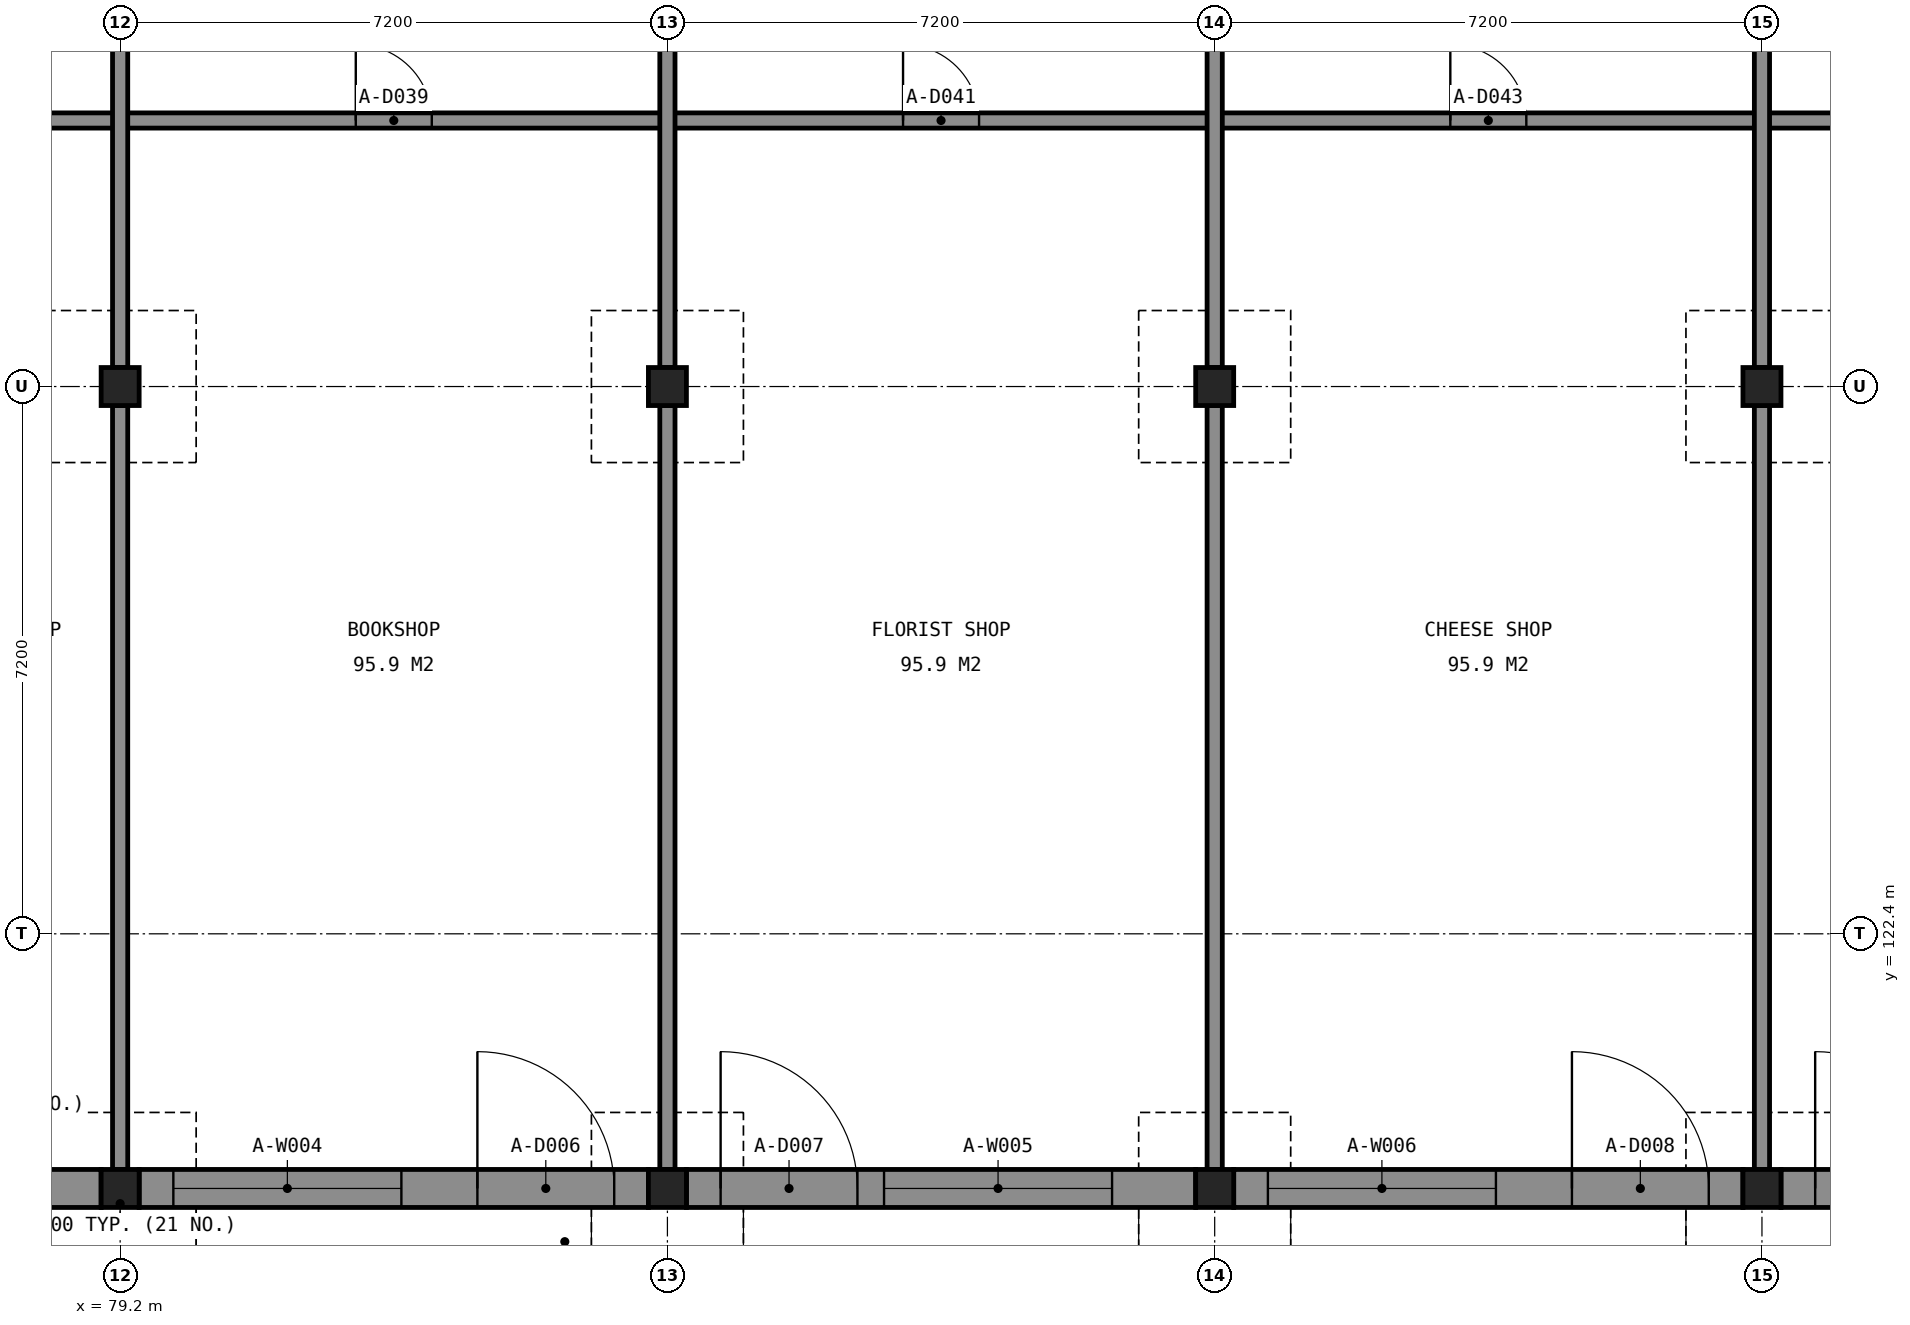
"""IFC4 building model, lengths in metres.
Left out: names, types, materials, properties, quantities, classifications, styles, units other than length and angle.
Written with IfcOpenShell. Run it as: python <this file> out.ifc"""

import sys

from ifc_helpers import new_model, si_unit, direction, frame, frame_2d, origin, origin_2d, place, context, subcontext, project, spatial, rectangle, extrude, element, fill, save


model = new_model("IFC4")
c1 = context("Model", 3, precision=1e-05, world=origin(), true_north=direction((0.0, 1.0)))
c2 = subcontext(c1, "Body", "Model", "MODEL_VIEW")
j1 = project(units=[si_unit("LENGTHUNIT", "METRE"), si_unit("PLANEANGLEUNIT", "RADIAN")], contexts=[c1])
p1 = place(None, origin())
s1 = spatial("IfcSite", under=j1, at=p1, CompositionType="ELEMENT")
p2 = place(p1, origin())
s2 = spatial("IfcBuilding", under=s1, at=p2, CompositionType="ELEMENT")
p3 = place(p2, origin())
s3 = spatial("IfcBuildingStorey", under=s2, at=p3, CompositionType="ELEMENT", Elevation=0.0)
for number, where, z_axis, x_axis in (
    (1, (79.2, 119.05, 0.0), (0.0, 0.0, 1.0), (1.0, 0.0, 0.0)),
    (2, (86.4, 119.05, 0.0), (0.0, 0.0, 1.0), (1.0, 0.0, 0.0)),
    (3, (93.6, 119.05, 0.0), (0.0, 0.0, 1.0), (1.0, 0.0, 0.0)),
    (4, (100.8, 119.05, 0.0), (0.0, 0.0, 1.0), (1.0, 0.0, 0.0)),
    (5, (79.2, 129.6, 0.0), (0.0, 0.0, 1.0), (1.0, 0.0, 0.0)),
    (6, (86.4, 129.6, 0.0), (0.0, 0.0, 1.0), (1.0, 0.0, 0.0)),
    (7, (93.6, 129.6, 0.0), (0.0, 0.0, 1.0), (1.0, 0.0, 0.0)),
    (8, (100.8, 129.6, 0.0), (0.0, 0.0, 1.0), (1.0, 0.0, 0.0)),
):
    element("IfcColumn", number, at=place(p3, frame(where, z_axis=z_axis, x_axis=x_axis)), inside=s3, PredefinedType="COLUMN", context=c2, shape_type="SweptSolid", body=[
        extrude(rectangle(XDim=0.5, YDim=0.5, at=origin_2d()), origin(), (0.0, 0.0, 1.0), 3.7),
    ])
p4 = place(p3, frame((72.25, 119.05, 0.0), z_axis=(0.0, 0.0, 1.0), x_axis=(1.0, 0.0, 0.0)))
e9 = element("IfcWall", 9, at=p4, inside=s3, PredefinedType="SOLIDWALL", context=c2, shape_type="SweptSolid", body=[
    extrude(rectangle(XDim=6.7, YDim=0.5, at=frame_2d((3.35, 0.0))), origin(), (0.0, 0.0, 1.0), 3.6),
])
p5 = place(p4, frame((0.45, 0.0, 0.0)))
e10 = element("IfcOpeningElement", 10, at=p5, cuts=e9, PredefinedType="OPENING", context=c2, shape_type="SweptSolid", body=[
    extrude(rectangle(XDim=1.8, YDim=2.4, at=frame_2d((0.9, 1.2))), frame((0.0, 0.26, 0.0), z_axis=(0.0, -1.0, 0.0), x_axis=(1.0, 0.0, 0.0)), (0.0, 0.0, 1.0), 0.52),
])
p6 = place(p4, frame((2.6, 0.0, 0.6)))
e11 = element("IfcOpeningElement", 11, at=p6, cuts=e9, PredefinedType="OPENING", context=c2, shape_type="SweptSolid", body=[
    extrude(rectangle(XDim=3.0, YDim=2.4, at=frame_2d((1.5, 1.2))), frame((0.0, 0.26, 0.0), z_axis=(0.0, -1.0, 0.0), x_axis=(1.0, 0.0, 0.0)), (0.0, 0.0, 1.0), 0.52),
])
p7 = place(p3, frame((79.45, 119.05, 0.0), z_axis=(0.0, 0.0, 1.0), x_axis=(1.0, 0.0, 0.0)))
e12 = element("IfcWall", 12, at=p7, inside=s3, PredefinedType="SOLIDWALL", context=c2, shape_type="SweptSolid", body=[
    extrude(rectangle(XDim=6.7, YDim=0.5, at=frame_2d((3.35, 0.0))), origin(), (0.0, 0.0, 1.0), 3.6),
])
p8 = place(p7, frame((4.45, 0.0, 0.0)))
e13 = element("IfcOpeningElement", 13, at=p8, cuts=e12, PredefinedType="OPENING", context=c2, shape_type="SweptSolid", body=[
    extrude(rectangle(XDim=1.8, YDim=2.4, at=frame_2d((0.9, 1.2))), frame((0.0, 0.26, 0.0), z_axis=(0.0, -1.0, 0.0), x_axis=(1.0, 0.0, 0.0)), (0.0, 0.0, 1.0), 0.52),
])
p9 = place(p7, frame((0.45, 0.0, 0.6)))
e14 = element("IfcOpeningElement", 14, at=p9, cuts=e12, PredefinedType="OPENING", context=c2, shape_type="SweptSolid", body=[
    extrude(rectangle(XDim=3.0, YDim=2.4, at=frame_2d((1.5, 1.2))), frame((0.0, 0.26, 0.0), z_axis=(0.0, -1.0, 0.0), x_axis=(1.0, 0.0, 0.0)), (0.0, 0.0, 1.0), 0.52),
])
p10 = place(p3, frame((86.65, 119.05, 0.0), z_axis=(0.0, 0.0, 1.0), x_axis=(1.0, 0.0, 0.0)))
e15 = element("IfcWall", 15, at=p10, inside=s3, PredefinedType="SOLIDWALL", context=c2, shape_type="SweptSolid", body=[
    extrude(rectangle(XDim=6.7, YDim=0.5, at=frame_2d((3.35, 0.0))), origin(), (0.0, 0.0, 1.0), 3.6),
])
p11 = place(p10, frame((0.45, 0.0, 0.0)))
e16 = element("IfcOpeningElement", 16, at=p11, cuts=e15, PredefinedType="OPENING", context=c2, shape_type="SweptSolid", body=[
    extrude(rectangle(XDim=1.8, YDim=2.4, at=frame_2d((0.9, 1.2))), frame((0.0, 0.26, 0.0), z_axis=(0.0, -1.0, 0.0), x_axis=(1.0, 0.0, 0.0)), (0.0, 0.0, 1.0), 0.52),
])
p12 = place(p10, frame((2.6, 0.0, 0.6)))
e17 = element("IfcOpeningElement", 17, at=p12, cuts=e15, PredefinedType="OPENING", context=c2, shape_type="SweptSolid", body=[
    extrude(rectangle(XDim=3.0, YDim=2.4, at=frame_2d((1.5, 1.2))), frame((0.0, 0.26, 0.0), z_axis=(0.0, -1.0, 0.0), x_axis=(1.0, 0.0, 0.0)), (0.0, 0.0, 1.0), 0.52),
])
p13 = place(p3, frame((93.85, 119.05, 0.0), z_axis=(0.0, 0.0, 1.0), x_axis=(1.0, 0.0, 0.0)))
e18 = element("IfcWall", 18, at=p13, inside=s3, PredefinedType="SOLIDWALL", context=c2, shape_type="SweptSolid", body=[
    extrude(rectangle(XDim=6.7, YDim=0.5, at=frame_2d((3.35, 0.0))), origin(), (0.0, 0.0, 1.0), 3.6),
])
p14 = place(p13, frame((4.45, 0.0, 0.0)))
e19 = element("IfcOpeningElement", 19, at=p14, cuts=e18, PredefinedType="OPENING", context=c2, shape_type="SweptSolid", body=[
    extrude(rectangle(XDim=1.8, YDim=2.4, at=frame_2d((0.9, 1.2))), frame((0.0, 0.26, 0.0), z_axis=(0.0, -1.0, 0.0), x_axis=(1.0, 0.0, 0.0)), (0.0, 0.0, 1.0), 0.52),
])
p15 = place(p13, frame((0.45, 0.0, 0.6)))
e20 = element("IfcOpeningElement", 20, at=p15, cuts=e18, PredefinedType="OPENING", context=c2, shape_type="SweptSolid", body=[
    extrude(rectangle(XDim=3.0, YDim=2.4, at=frame_2d((1.5, 1.2))), frame((0.0, 0.26, 0.0), z_axis=(0.0, -1.0, 0.0), x_axis=(1.0, 0.0, 0.0)), (0.0, 0.0, 1.0), 0.52),
])
p16 = place(p3, frame((101.05, 119.05, 0.0), z_axis=(0.0, 0.0, 1.0), x_axis=(1.0, 0.0, 0.0)))
e21 = element("IfcWall", 21, at=p16, inside=s3, PredefinedType="SOLIDWALL", context=c2, shape_type="SweptSolid", body=[
    extrude(rectangle(XDim=6.7, YDim=0.5, at=frame_2d((3.35, 0.0))), origin(), (0.0, 0.0, 1.0), 3.6),
])
p17 = place(p16, frame((0.45, 0.0, 0.0)))
e22 = element("IfcOpeningElement", 22, at=p17, cuts=e21, PredefinedType="OPENING", context=c2, shape_type="SweptSolid", body=[
    extrude(rectangle(XDim=1.8, YDim=2.4, at=frame_2d((0.9, 1.2))), frame((0.0, 0.26, 0.0), z_axis=(0.0, -1.0, 0.0), x_axis=(1.0, 0.0, 0.0)), (0.0, 0.0, 1.0), 0.52),
])
p18 = place(p16, frame((2.6, 0.0, 0.6)))
e23 = element("IfcOpeningElement", 23, at=p18, cuts=e21, PredefinedType="OPENING", context=c2, shape_type="SweptSolid", body=[
    extrude(rectangle(XDim=3.0, YDim=2.4, at=frame_2d((1.5, 1.2))), frame((0.0, 0.26, 0.0), z_axis=(0.0, -1.0, 0.0), x_axis=(1.0, 0.0, 0.0)), (0.0, 0.0, 1.0), 0.52),
])
p19 = place(p3, frame((57.7, 133.1, 0.0), z_axis=(0.0, 0.0, 1.0), x_axis=(1.0, 0.0, 0.0)))
e24 = element("IfcWall", 24, at=p19, inside=s3, PredefinedType="PARTITIONING", context=c2, shape_type="SweptSolid", body=[
    extrude(rectangle(XDim=86.2, YDim=0.2, at=frame_2d((43.1, 0.0))), origin(), (0.0, 0.0, 1.0), 3.5),
])
p20 = place(p19, frame((3.0, 0.0, 0.0)))
e25 = element("IfcOpeningElement", 25, at=p20, cuts=e24, PredefinedType="OPENING", context=c2, shape_type="SweptSolid", body=[
    extrude(rectangle(XDim=1.0, YDim=2.1, at=frame_2d((0.5, 1.05))), frame((0.0, 0.11, 0.0), z_axis=(0.0, -1.0, 0.0), x_axis=(1.0, 0.0, 0.0)), (0.0, 0.0, 1.0), 0.22),
])
p21 = place(p19, frame((10.2, 0.0, 0.0)))
e26 = element("IfcOpeningElement", 26, at=p21, cuts=e24, PredefinedType="OPENING", context=c2, shape_type="SweptSolid", body=[
    extrude(rectangle(XDim=1.0, YDim=2.1, at=frame_2d((0.5, 1.05))), frame((0.0, 0.11, 0.0), z_axis=(0.0, -1.0, 0.0), x_axis=(1.0, 0.0, 0.0)), (0.0, 0.0, 1.0), 0.22),
])
p22 = place(p19, frame((17.4, 0.0, 0.0)))
e27 = element("IfcOpeningElement", 27, at=p22, cuts=e24, PredefinedType="OPENING", context=c2, shape_type="SweptSolid", body=[
    extrude(rectangle(XDim=1.0, YDim=2.1, at=frame_2d((0.5, 1.05))), frame((0.0, 0.11, 0.0), z_axis=(0.0, -1.0, 0.0), x_axis=(1.0, 0.0, 0.0)), (0.0, 0.0, 1.0), 0.22),
])
p23 = place(p19, frame((24.6, 0.0, 0.0)))
e28 = element("IfcOpeningElement", 28, at=p23, cuts=e24, PredefinedType="OPENING", context=c2, shape_type="SweptSolid", body=[
    extrude(rectangle(XDim=1.0, YDim=2.1, at=frame_2d((0.5, 1.05))), frame((0.0, 0.11, 0.0), z_axis=(0.0, -1.0, 0.0), x_axis=(1.0, 0.0, 0.0)), (0.0, 0.0, 1.0), 0.22),
])
p24 = place(p19, frame((31.8, 0.0, 0.0)))
e29 = element("IfcOpeningElement", 29, at=p24, cuts=e24, PredefinedType="OPENING", context=c2, shape_type="SweptSolid", body=[
    extrude(rectangle(XDim=1.0, YDim=2.1, at=frame_2d((0.5, 1.05))), frame((0.0, 0.11, 0.0), z_axis=(0.0, -1.0, 0.0), x_axis=(1.0, 0.0, 0.0)), (0.0, 0.0, 1.0), 0.22),
])
p25 = place(p19, frame((39.0, 0.0, 0.0)))
e30 = element("IfcOpeningElement", 30, at=p25, cuts=e24, PredefinedType="OPENING", context=c2, shape_type="SweptSolid", body=[
    extrude(rectangle(XDim=1.0, YDim=2.1, at=frame_2d((0.5, 1.05))), frame((0.0, 0.11, 0.0), z_axis=(0.0, -1.0, 0.0), x_axis=(1.0, 0.0, 0.0)), (0.0, 0.0, 1.0), 0.22),
])
p26 = place(p19, frame((46.2, 0.0, 0.0)))
e31 = element("IfcOpeningElement", 31, at=p26, cuts=e24, PredefinedType="OPENING", context=c2, shape_type="SweptSolid", body=[
    extrude(rectangle(XDim=1.0, YDim=2.1, at=frame_2d((0.5, 1.05))), frame((0.0, 0.11, 0.0), z_axis=(0.0, -1.0, 0.0), x_axis=(1.0, 0.0, 0.0)), (0.0, 0.0, 1.0), 0.22),
])
p27 = place(p19, frame((53.4, 0.0, 0.0)))
e32 = element("IfcOpeningElement", 32, at=p27, cuts=e24, PredefinedType="OPENING", context=c2, shape_type="SweptSolid", body=[
    extrude(rectangle(XDim=1.0, YDim=2.1, at=frame_2d((0.5, 1.05))), frame((0.0, 0.11, 0.0), z_axis=(0.0, -1.0, 0.0), x_axis=(1.0, 0.0, 0.0)), (0.0, 0.0, 1.0), 0.22),
])
p28 = place(p19, frame((60.6, 0.0, 0.0)))
e33 = element("IfcOpeningElement", 33, at=p28, cuts=e24, PredefinedType="OPENING", context=c2, shape_type="SweptSolid", body=[
    extrude(rectangle(XDim=1.0, YDim=2.1, at=frame_2d((0.5, 1.05))), frame((0.0, 0.11, 0.0), z_axis=(0.0, -1.0, 0.0), x_axis=(1.0, 0.0, 0.0)), (0.0, 0.0, 1.0), 0.22),
])
p29 = place(p19, frame((67.8, 0.0, 0.0)))
e34 = element("IfcOpeningElement", 34, at=p29, cuts=e24, PredefinedType="OPENING", context=c2, shape_type="SweptSolid", body=[
    extrude(rectangle(XDim=1.0, YDim=2.1, at=frame_2d((0.5, 1.05))), frame((0.0, 0.11, 0.0), z_axis=(0.0, -1.0, 0.0), x_axis=(1.0, 0.0, 0.0)), (0.0, 0.0, 1.0), 0.22),
])
p30 = place(p19, frame((75.0, 0.0, 0.0)))
e35 = element("IfcOpeningElement", 35, at=p30, cuts=e24, PredefinedType="OPENING", context=c2, shape_type="SweptSolid", body=[
    extrude(rectangle(XDim=1.0, YDim=2.1, at=frame_2d((0.5, 1.05))), frame((0.0, 0.11, 0.0), z_axis=(0.0, -1.0, 0.0), x_axis=(1.0, 0.0, 0.0)), (0.0, 0.0, 1.0), 0.22),
])
p31 = place(p19, frame((84.65, 0.0, 0.0)))
e36 = element("IfcOpeningElement", 36, at=p31, cuts=e24, PredefinedType="OPENING", context=c2, shape_type="SweptSolid", body=[
    extrude(rectangle(XDim=0.9, YDim=2.1, at=frame_2d((0.45, 1.05))), frame((0.0, 0.11, 0.0), z_axis=(0.0, -1.0, 0.0), x_axis=(1.0, 0.0, 0.0)), (0.0, 0.0, 1.0), 0.22),
])
p32 = place(p3, frame((79.2, 119.3, 0.0), z_axis=(0.0, 0.0, 1.0), x_axis=(0.0, 1.0, 0.0)))
e37 = element("IfcWall", 37, at=p32, inside=s3, PredefinedType="PARTITIONING", context=c2, shape_type="SweptSolid", body=[
    extrude(rectangle(XDim=10.05, YDim=0.2, at=frame_2d((5.025, 0.0))), origin(), (0.0, 0.0, 1.0), 3.5),
])
p33 = place(p3, frame((79.2, 129.85, 0.0), z_axis=(0.0, 0.0, 1.0), x_axis=(0.0, 1.0, 0.0)))
e38 = element("IfcWall", 38, at=p33, inside=s3, PredefinedType="PARTITIONING", context=c2, shape_type="SweptSolid", body=[
    extrude(rectangle(XDim=7.95, YDim=0.2, at=frame_2d((3.975, 0.0))), origin(), (0.0, 0.0, 1.0), 3.5),
])
p34 = place(p3, frame((86.4, 119.3, 0.0), z_axis=(0.0, 0.0, 1.0), x_axis=(0.0, 1.0, 0.0)))
e39 = element("IfcWall", 39, at=p34, inside=s3, PredefinedType="PARTITIONING", context=c2, shape_type="SweptSolid", body=[
    extrude(rectangle(XDim=10.05, YDim=0.2, at=frame_2d((5.025, 0.0))), origin(), (0.0, 0.0, 1.0), 3.5),
])
p35 = place(p3, frame((86.4, 129.85, 0.0), z_axis=(0.0, 0.0, 1.0), x_axis=(0.0, 1.0, 0.0)))
e40 = element("IfcWall", 40, at=p35, inside=s3, PredefinedType="PARTITIONING", context=c2, shape_type="SweptSolid", body=[
    extrude(rectangle(XDim=7.95, YDim=0.2, at=frame_2d((3.975, 0.0))), origin(), (0.0, 0.0, 1.0), 3.5),
])
p36 = place(p3, frame((93.6, 119.3, 0.0), z_axis=(0.0, 0.0, 1.0), x_axis=(0.0, 1.0, 0.0)))
e41 = element("IfcWall", 41, at=p36, inside=s3, PredefinedType="PARTITIONING", context=c2, shape_type="SweptSolid", body=[
    extrude(rectangle(XDim=10.05, YDim=0.2, at=frame_2d((5.025, 0.0))), origin(), (0.0, 0.0, 1.0), 3.5),
])
p37 = place(p3, frame((93.6, 129.85, 0.0), z_axis=(0.0, 0.0, 1.0), x_axis=(0.0, 1.0, 0.0)))
e42 = element("IfcWall", 42, at=p37, inside=s3, PredefinedType="PARTITIONING", context=c2, shape_type="SweptSolid", body=[
    extrude(rectangle(XDim=7.95, YDim=0.2, at=frame_2d((3.975, 0.0))), origin(), (0.0, 0.0, 1.0), 3.5),
])
p38 = place(p3, frame((100.8, 119.3, 0.0), z_axis=(0.0, 0.0, 1.0), x_axis=(0.0, 1.0, 0.0)))
e43 = element("IfcWall", 43, at=p38, inside=s3, PredefinedType="PARTITIONING", context=c2, shape_type="SweptSolid", body=[
    extrude(rectangle(XDim=10.05, YDim=0.2, at=frame_2d((5.025, 0.0))), origin(), (0.0, 0.0, 1.0), 3.5),
])
p39 = place(p3, frame((100.8, 129.85, 0.0), z_axis=(0.0, 0.0, 1.0), x_axis=(0.0, 1.0, 0.0)))
e44 = element("IfcWall", 44, at=p39, inside=s3, PredefinedType="PARTITIONING", context=c2, shape_type="SweptSolid", body=[
    extrude(rectangle(XDim=7.95, YDim=0.2, at=frame_2d((3.975, 0.0))), origin(), (0.0, 0.0, 1.0), 3.5),
])
p40 = place(p8, origin())
e45 = element("IfcDoor", 45, at=p40, inside=s3, OperationType="DOUBLE_DOOR_DOUBLE_SWING", PredefinedType="DOOR", context=c2, shape_type="SweptSolid", body=[
    extrude(rectangle(XDim=1.8, YDim=2.4, at=frame_2d((0.9, 1.2))), frame((0.0, 0.025, 0.0), z_axis=(0.0, -1.0, 0.0), x_axis=(1.0, 0.0, 0.0)), (0.0, 0.0, 1.0), 0.05),
])
fill(e13, e45)
p41 = place(p9, origin())
e46 = element("IfcWindow", 46, at=p41, inside=s3, PartitioningType="SINGLE_PANEL", PredefinedType="WINDOW", context=c2, shape_type="SweptSolid", body=[
    extrude(rectangle(XDim=3.0, YDim=2.4, at=frame_2d((1.5, 1.2))), frame((0.0, 0.03, 0.0), z_axis=(0.0, -1.0, 0.0), x_axis=(1.0, 0.0, 0.0)), (0.0, 0.0, 1.0), 0.06),
])
fill(e14, e46)
p42 = place(p11, origin())
e47 = element("IfcDoor", 47, at=p42, inside=s3, OperationType="DOUBLE_DOOR_DOUBLE_SWING", PredefinedType="DOOR", context=c2, shape_type="SweptSolid", body=[
    extrude(rectangle(XDim=1.8, YDim=2.4, at=frame_2d((0.9, 1.2))), frame((0.0, 0.025, 0.0), z_axis=(0.0, -1.0, 0.0), x_axis=(1.0, 0.0, 0.0)), (0.0, 0.0, 1.0), 0.05),
])
fill(e16, e47)
p43 = place(p12, origin())
e48 = element("IfcWindow", 48, at=p43, inside=s3, PartitioningType="SINGLE_PANEL", PredefinedType="WINDOW", context=c2, shape_type="SweptSolid", body=[
    extrude(rectangle(XDim=3.0, YDim=2.4, at=frame_2d((1.5, 1.2))), frame((0.0, 0.03, 0.0), z_axis=(0.0, -1.0, 0.0), x_axis=(1.0, 0.0, 0.0)), (0.0, 0.0, 1.0), 0.06),
])
fill(e17, e48)
p44 = place(p14, origin())
e49 = element("IfcDoor", 49, at=p44, inside=s3, OperationType="DOUBLE_DOOR_DOUBLE_SWING", PredefinedType="DOOR", context=c2, shape_type="SweptSolid", body=[
    extrude(rectangle(XDim=1.8, YDim=2.4, at=frame_2d((0.9, 1.2))), frame((0.0, 0.025, 0.0), z_axis=(0.0, -1.0, 0.0), x_axis=(1.0, 0.0, 0.0)), (0.0, 0.0, 1.0), 0.05),
])
fill(e19, e49)
p45 = place(p15, origin())
e50 = element("IfcWindow", 50, at=p45, inside=s3, PartitioningType="SINGLE_PANEL", PredefinedType="WINDOW", context=c2, shape_type="SweptSolid", body=[
    extrude(rectangle(XDim=3.0, YDim=2.4, at=frame_2d((1.5, 1.2))), frame((0.0, 0.03, 0.0), z_axis=(0.0, -1.0, 0.0), x_axis=(1.0, 0.0, 0.0)), (0.0, 0.0, 1.0), 0.06),
])
fill(e20, e50)
p46 = place(p17, origin())
e51 = element("IfcDoor", 51, at=p46, inside=s3, OperationType="DOUBLE_DOOR_DOUBLE_SWING", PredefinedType="DOOR", context=c2, shape_type="SweptSolid", body=[
    extrude(rectangle(XDim=1.8, YDim=2.4, at=frame_2d((0.9, 1.2))), frame((0.0, 0.025, 0.0), z_axis=(0.0, -1.0, 0.0), x_axis=(1.0, 0.0, 0.0)), (0.0, 0.0, 1.0), 0.05),
])
fill(e22, e51)
p47 = place(p23, origin())
e52 = element("IfcDoor", 52, at=p47, inside=s3, OperationType="SINGLE_SWING_LEFT", PredefinedType="DOOR", context=c2, shape_type="SweptSolid", body=[
    extrude(rectangle(XDim=1.0, YDim=2.1, at=frame_2d((0.5, 1.05))), frame((0.0, 0.025, 0.0), z_axis=(0.0, -1.0, 0.0), x_axis=(1.0, 0.0, 0.0)), (0.0, 0.0, 1.0), 0.05),
])
fill(e28, e52)
p48 = place(p24, origin())
e53 = element("IfcDoor", 53, at=p48, inside=s3, OperationType="SINGLE_SWING_LEFT", PredefinedType="DOOR", context=c2, shape_type="SweptSolid", body=[
    extrude(rectangle(XDim=1.0, YDim=2.1, at=frame_2d((0.5, 1.05))), frame((0.0, 0.025, 0.0), z_axis=(0.0, -1.0, 0.0), x_axis=(1.0, 0.0, 0.0)), (0.0, 0.0, 1.0), 0.05),
])
fill(e29, e53)
p49 = place(p25, origin())
e54 = element("IfcDoor", 54, at=p49, inside=s3, OperationType="SINGLE_SWING_LEFT", PredefinedType="DOOR", context=c2, shape_type="SweptSolid", body=[
    extrude(rectangle(XDim=1.0, YDim=2.1, at=frame_2d((0.5, 1.05))), frame((0.0, 0.025, 0.0), z_axis=(0.0, -1.0, 0.0), x_axis=(1.0, 0.0, 0.0)), (0.0, 0.0, 1.0), 0.05),
])
fill(e30, e54)
save(model, sys.argv[1])
